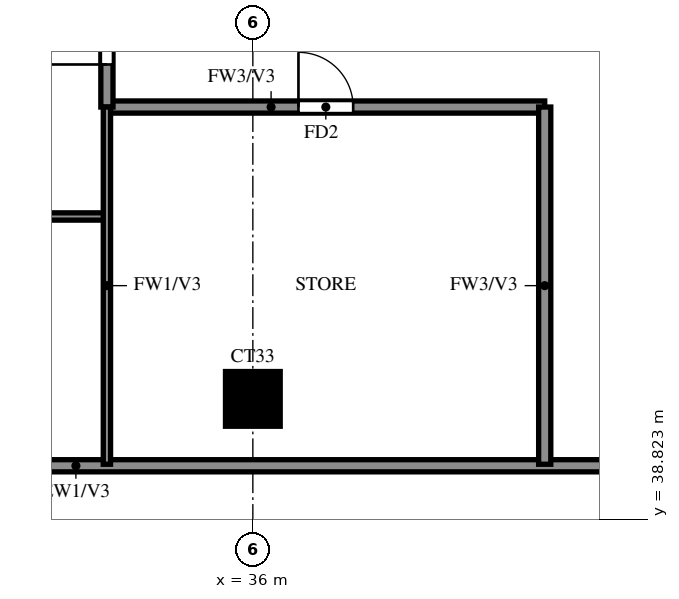
"""IFC4 building model, lengths in metres.
Left out: names, types, materials, properties, quantities, classifications, styles, units other than length and angle.
Written with IfcOpenShell. Run it as: python <this file> out.ifc"""

import sys

from ifc_helpers import new_model, si_unit, direction, frame, frame_2d, origin, origin_2d, place, context, subcontext, project, spatial, rectangle, extrude, source, transform, mapped, element, fill, save


model = new_model("IFC4")
c1 = context("Model", 3, precision=1e-05, world=origin(), true_north=direction((0.0, 1.0)))
c2 = subcontext(c1, "Body", "Model", "MODEL_VIEW")
j1 = project(units=[si_unit("LENGTHUNIT", "METRE"), si_unit("PLANEANGLEUNIT", "RADIAN")], contexts=[c1])
p1 = place(None, origin())
s1 = spatial("IfcSite", under=j1, at=p1, CompositionType="ELEMENT")
p2 = place(p1, origin())
s2 = spatial("IfcBuilding", under=s1, at=p2, CompositionType="ELEMENT")
p3 = place(p2, frame((0.0, 0.0, 215.0)))
s3 = spatial("IfcBuildingStorey", under=s2, at=p3, CompositionType="ELEMENT", Elevation=215.0)
m1 = source(origin(), c2, "Body", "SweptSolid", [
    extrude(rectangle(XDim=0.9, YDim=0.9, at=origin_2d()), origin(), (0.0, 0.0, 1.0), 3.22),
])
p4 = place(p3, frame((36.0, 40.8, 0.0), z_axis=(0.0, 0.0, 1.0), x_axis=(1.0, 0.0, 0.0)))
e1 = element("IfcColumn", 1, at=p4, inside=s3, PredefinedType="COLUMN", context=c2, shape_type="MappedRepresentation", body=[
    mapped(m1, transform((0.0, 0.0, 0.0))),
])
p5 = place(p3, frame((22.2, 39.7, 0.0), z_axis=(0.0, 0.0, 1.0), x_axis=(1.0, 0.0, 0.0)))
e2 = element("IfcWall", 2, at=p5, inside=s3, PredefinedType="SOLIDWALL", context=c2, shape_type="SweptSolid", body=[
    extrude(rectangle(XDim=19.8, YDim=0.2, at=frame_2d((9.9, 0.0))), origin(), (0.0, 0.0, 1.0), 3.22),
])
p6 = place(p5, frame((0.7, 0.0, 0.6)))
e3 = element("IfcOpeningElement", 3, at=p6, cuts=e2, PredefinedType="OPENING", context=c2, shape_type="SweptSolid", body=[
    extrude(rectangle(XDim=1.8, YDim=2.4, at=frame_2d((0.9, 1.2))), frame((0.0, 0.11, 0.0), z_axis=(0.0, -1.0, 0.0), x_axis=(1.0, 0.0, 0.0)), (0.0, 0.0, 1.0), 0.22),
])
p7 = place(p5, frame((7.8, 0.0, 0.6)))
e4 = element("IfcOpeningElement", 4, at=p7, cuts=e2, PredefinedType="OPENING", context=c2, shape_type="SweptSolid", body=[
    extrude(rectangle(XDim=2.4, YDim=2.4, at=frame_2d((1.2, 1.2))), frame((0.0, 0.11, 0.0), z_axis=(0.0, -1.0, 0.0), x_axis=(1.0, 0.0, 0.0)), (0.0, 0.0, 1.0), 0.22),
])
p8 = place(p5, frame((4.35, 0.0, 1.5)))
e5 = element("IfcOpeningElement", 5, at=p8, cuts=e2, PredefinedType="OPENING", context=c2, shape_type="SweptSolid", body=[
    extrude(rectangle(XDim=0.9, YDim=0.9, at=frame_2d((0.45, 0.45))), frame((0.0, 0.11, 0.0), z_axis=(0.0, -1.0, 0.0), x_axis=(1.0, 0.0, 0.0)), (0.0, 0.0, 1.0), 0.22),
])
p9 = place(p3, frame((33.6, 45.6, 0.0), z_axis=(0.0, 0.0, 1.0), x_axis=(1.0, 0.0, 0.0)))
e6 = element("IfcWall", 6, at=p9, inside=s3, PredefinedType="SOLIDWALL", context=c2, shape_type="SweptSolid", body=[
    extrude(rectangle(XDim=7.2, YDim=0.2, at=frame_2d((3.6, 0.0))), origin(), (0.0, 0.0, 1.0), 3.22),
])
p10 = place(p9, frame((3.15, 0.0, 0.0)))
e7 = element("IfcOpeningElement", 7, at=p10, cuts=e6, PredefinedType="OPENING", context=c2, shape_type="SweptSolid", body=[
    extrude(rectangle(XDim=0.9, YDim=2.1, at=frame_2d((0.45, 1.05))), frame((0.0, 0.11, 0.0), z_axis=(0.0, -1.0, 0.0), x_axis=(1.0, 0.0, 0.0)), (0.0, 0.0, 1.0), 0.22),
])
p11 = place(p3, frame((33.6, 45.6, 0.0), z_axis=(0.0, 0.0, 1.0), x_axis=(0.0, 1.0, 0.0)))
e8 = element("IfcWall", 8, at=p11, inside=s3, PredefinedType="SOLIDWALL", context=c2, shape_type="SweptSolid", body=[
    extrude(rectangle(XDim=8.4, YDim=0.2, at=frame_2d((4.2, 0.0))), origin(), (0.0, 0.0, 1.0), 3.22),
])
p12 = place(p11, frame((0.7, 0.0, 0.0)))
e9 = element("IfcOpeningElement", 9, at=p12, cuts=e8, PredefinedType="OPENING", context=c2, shape_type="SweptSolid", body=[
    extrude(rectangle(XDim=1.0, YDim=2.1, at=frame_2d((0.5, 1.05))), frame((0.0, 0.11, 0.0), z_axis=(0.0, -1.0, 0.0), x_axis=(1.0, 0.0, 0.0)), (0.0, 0.0, 1.0), 0.22),
])
p13 = place(p11, frame((6.7, 0.0, 0.0)))
e10 = element("IfcOpeningElement", 10, at=p13, cuts=e8, PredefinedType="OPENING", context=c2, shape_type="SweptSolid", body=[
    extrude(rectangle(XDim=1.0, YDim=2.1, at=frame_2d((0.5, 1.05))), frame((0.0, 0.11, 0.0), z_axis=(0.0, -1.0, 0.0), x_axis=(1.0, 0.0, 0.0)), (0.0, 0.0, 1.0), 0.22),
])
p14 = place(p3, frame((40.8, 39.725, 0.0), z_axis=(0.0, 0.0, 1.0), x_axis=(0.0, 1.0, 0.0)))
e11 = element("IfcWall", 11, at=p14, inside=s3, PredefinedType="SOLIDWALL", context=c2, shape_type="SweptSolid", body=[
    extrude(rectangle(XDim=5.875, YDim=0.2, at=frame_2d((2.938, 0.0))), origin(), (0.0, 0.0, 1.0), 3.22),
])
p15 = place(p3, frame((28.8, 43.8, 0.0), z_axis=(0.0, 0.0, 1.0), x_axis=(1.0, 0.0, 0.0)))
e12 = element("IfcWall", 12, at=p15, inside=s3, PredefinedType="PARTITIONING", context=c2, shape_type="SweptSolid", body=[
    extrude(rectangle(XDim=4.8, YDim=0.12, at=frame_2d((2.4, 0.0))), origin(), (0.0, 0.0, 1.0), 3.22),
])
p16 = place(p15, frame((1.95, 0.0, 0.0)))
e13 = element("IfcOpeningElement", 13, at=p16, cuts=e12, PredefinedType="OPENING", context=c2, shape_type="SweptSolid", body=[
    extrude(rectangle(XDim=0.9, YDim=2.1, at=frame_2d((0.45, 1.05))), frame((0.0, 0.07, 0.0), z_axis=(0.0, -1.0, 0.0), x_axis=(1.0, 0.0, 0.0)), (0.0, 0.0, 1.0), 0.14),
])
p17 = place(p3, frame((33.6, 39.725, 0.0), z_axis=(0.0, 0.0, 1.0), x_axis=(0.0, 1.0, 0.0)))
e14 = element("IfcWall", 14, at=p17, inside=s3, PredefinedType="PARTITIONING", context=c2, shape_type="SweptSolid", body=[
    extrude(rectangle(XDim=5.875, YDim=0.12, at=frame_2d((2.938, 0.0))), origin(), (0.0, 0.0, 1.0), 3.22),
])
p18 = place(p12, origin())
e15 = element("IfcDoor", 15, at=p18, inside=s3, OperationType="SINGLE_SWING_RIGHT", PredefinedType="DOOR", context=c2, shape_type="SweptSolid", body=[
    extrude(rectangle(XDim=1.0, YDim=2.1, at=frame_2d((0.5, 1.05))), frame((0.0, 0.025, 0.0), z_axis=(0.0, -1.0, 0.0), x_axis=(1.0, 0.0, 0.0)), (0.0, 0.0, 1.0), 0.05),
])
fill(e9, e15)
p19 = place(p10, origin())
e16 = element("IfcDoor", 16, at=p19, inside=s3, OperationType="SINGLE_SWING_LEFT", PredefinedType="DOOR", context=c2, shape_type="SweptSolid", body=[
    extrude(rectangle(XDim=0.9, YDim=2.1, at=frame_2d((0.45, 1.05))), frame((0.0, 0.025, 0.0), z_axis=(0.0, -1.0, 0.0), x_axis=(1.0, 0.0, 0.0)), (0.0, 0.0, 1.0), 0.05),
])
fill(e7, e16)
save(model, sys.argv[1])
